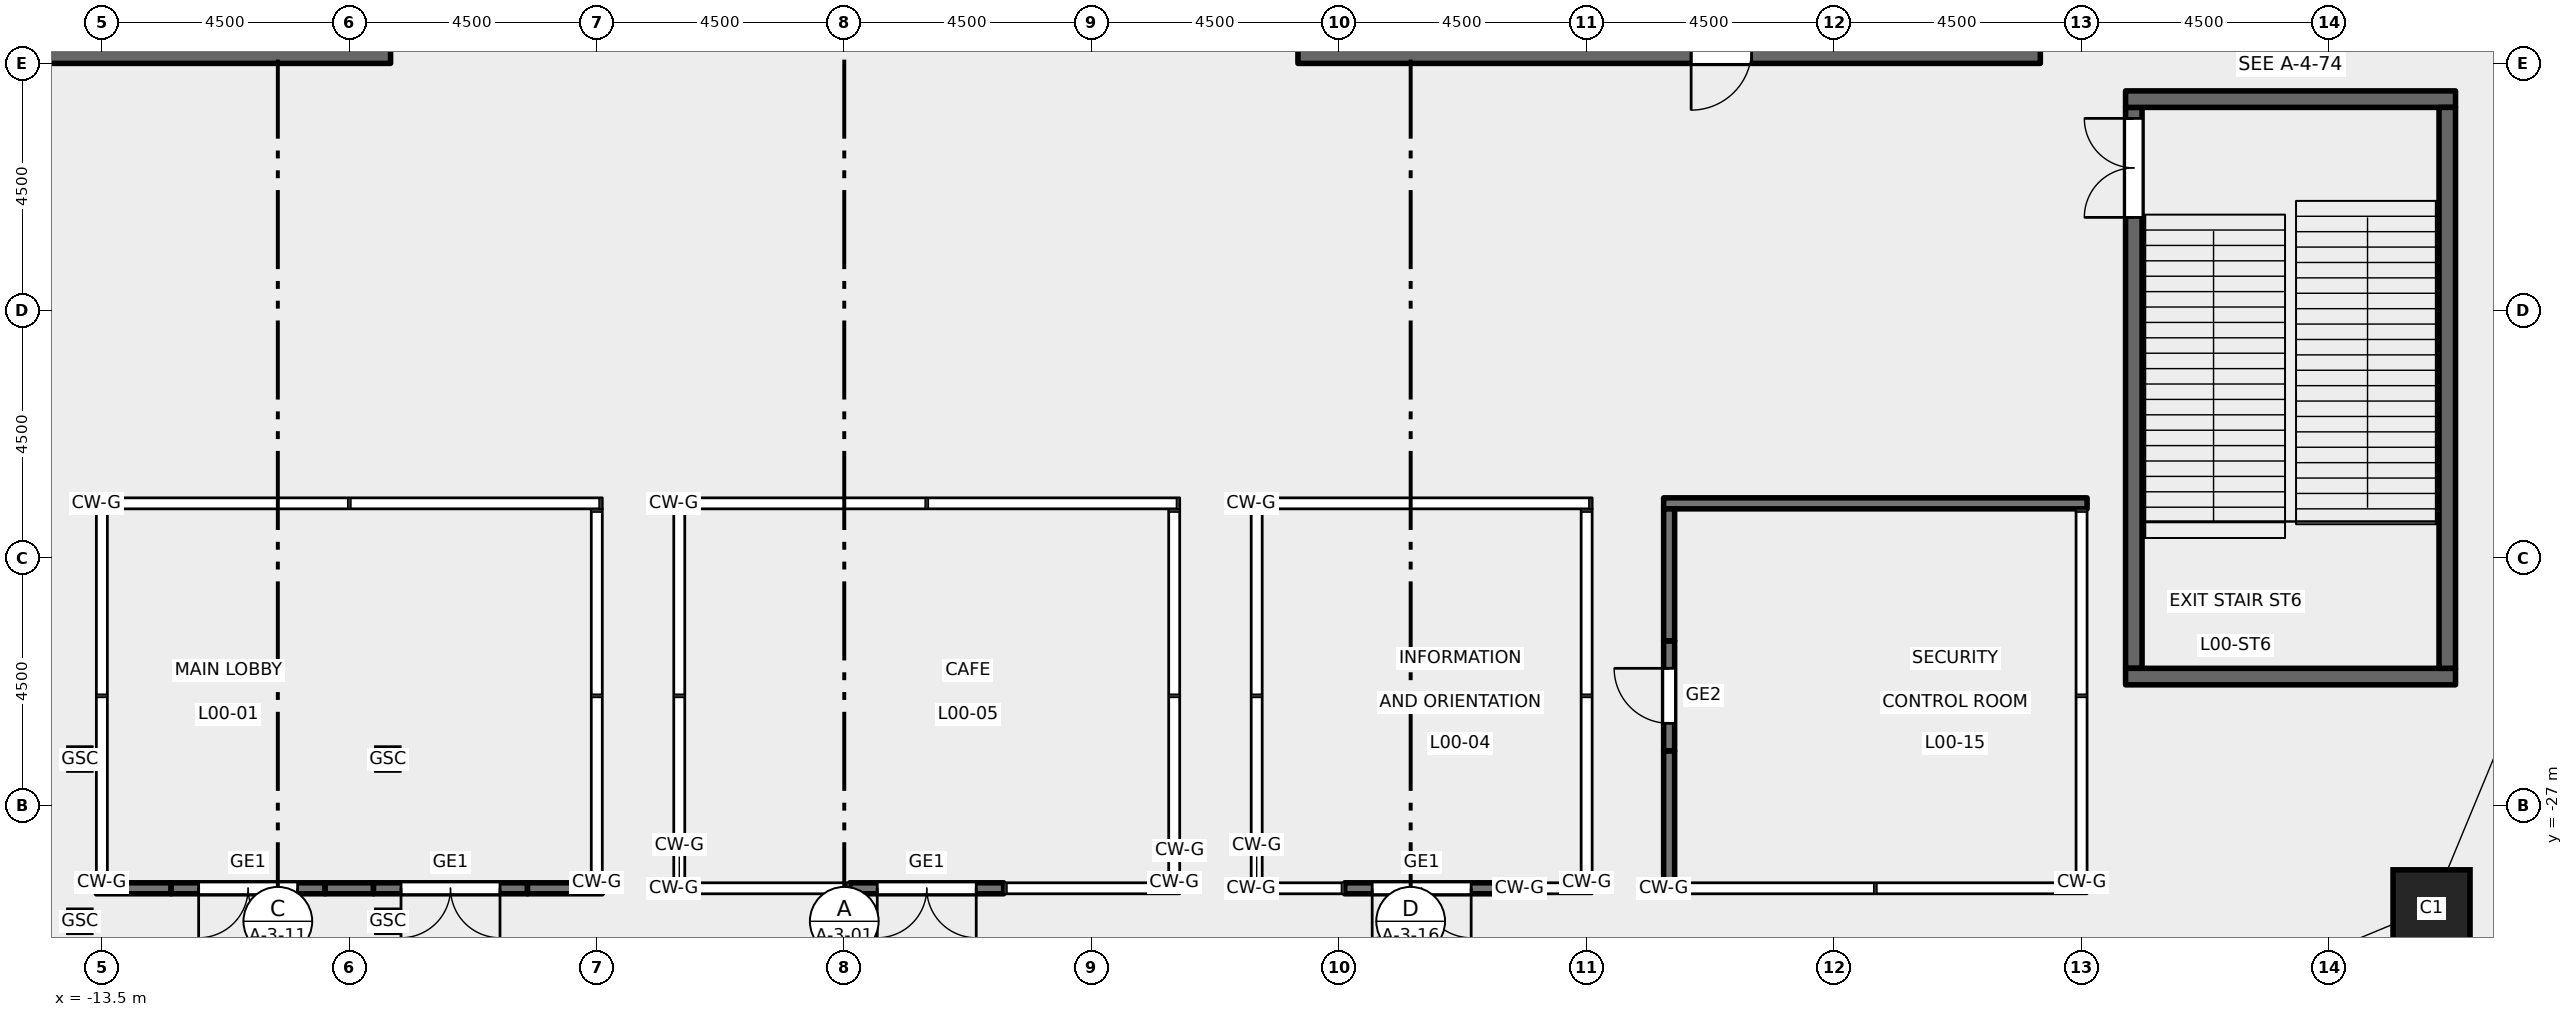
"""IFC4 building model, lengths in metres.
Left out: names, types, materials, properties, quantities, classifications, styles, units other than length and angle.
Written with IfcOpenShell. Run it as: python <this file> out.ifc"""

import sys

from ifc_helpers import new_model, si_unit, direction, frame, frame_2d, origin, origin_2d, place, context, subcontext, project, spatial, rectangle, hollow_rectangle, extrude, element, fill, save


model = new_model("IFC4")
c1 = context("Model", 3, precision=1e-05, world=origin(), true_north=direction((0.0, 1.0)))
c2 = subcontext(c1, "Body", "Model", "MODEL_VIEW")
j1 = project(units=[si_unit("LENGTHUNIT", "METRE"), si_unit("PLANEANGLEUNIT", "RADIAN")], contexts=[c1])
p1 = place(None, origin())
s1 = spatial("IfcSite", under=j1, at=p1, CompositionType="ELEMENT")
p2 = place(p1, origin())
s2 = spatial("IfcBuilding", under=s1, at=p2, CompositionType="ELEMENT")
p3 = place(p2, origin())
s3 = spatial("IfcBuildingStorey", under=s2, at=p3, CompositionType="ELEMENT", Elevation=0.0)
p4 = place(p3, frame((28.864, -28.864, 0.0), z_axis=(0.0, 0.0, 1.0), x_axis=(1.0, 0.0, 0.0)))
e1 = element("IfcColumn", 1, at=p4, inside=s3, PredefinedType="COLUMN", context=c2, shape_type="SweptSolid", body=[
    extrude(hollow_rectangle(XDim=1.4, YDim=1.4, WallThickness=0.07, at=origin_2d()), origin(), (0.0, 0.0, 1.0), 7.2),
])
p5 = place(p3, frame((-8.25, -13.25, 0.0), z_axis=(0.0, 0.0, 1.0), x_axis=(-1.0, 0.0, 0.0)))
e2 = element("IfcWall", 2, at=p5, inside=s3, PredefinedType="SHEAR", context=c2, shape_type="SweptSolid", body=[
    extrude(rectangle(XDim=13.5, YDim=0.5, at=frame_2d((6.75, 0.0))), origin(), (0.0, 0.0, 1.0), 7.0),
])
p6 = place(p5, frame((7.15, 0.0, 0.0)))
e3 = element("IfcOpeningElement", 3, at=p6, cuts=e2, PredefinedType="OPENING", context=c2, shape_type="SweptSolid", body=[
    extrude(rectangle(XDim=1.1, YDim=2.1, at=frame_2d((0.55, 1.05))), frame((0.0, 0.26, 0.0), z_axis=(0.0, -1.0, 0.0), x_axis=(1.0, 0.0, 0.0)), (0.0, 0.0, 1.0), 0.52),
])
p7 = place(p3, frame((8.25, -13.25, 0.0), z_axis=(0.0, 0.0, 1.0), x_axis=(1.0, 0.0, 0.0)))
e4 = element("IfcWall", 4, at=p7, inside=s3, PredefinedType="SHEAR", context=c2, shape_type="SweptSolid", body=[
    extrude(rectangle(XDim=13.5, YDim=0.5, at=frame_2d((6.75, 0.0))), origin(), (0.0, 0.0, 1.0), 7.0),
])
p8 = place(p7, frame((7.15, 0.0, 0.0)))
e5 = element("IfcOpeningElement", 5, at=p8, cuts=e4, PredefinedType="OPENING", context=c2, shape_type="SweptSolid", body=[
    extrude(rectangle(XDim=1.1, YDim=2.1, at=frame_2d((0.55, 1.05))), frame((0.0, 0.26, 0.0), z_axis=(0.0, -1.0, 0.0), x_axis=(1.0, 0.0, 0.0)), (0.0, 0.0, 1.0), 0.52),
])
p9 = place(p3, frame((-13.6, -28.5, 0.0), z_axis=(0.0, 0.0, 1.0), x_axis=(1.0, 0.0, 0.0)))
e6 = element("IfcWall", 6, at=p9, inside=s3, PredefinedType="SOLIDWALL", context=c2, shape_type="SweptSolid", body=[
    extrude(rectangle(XDim=1.36, YDim=0.2, at=frame_2d((0.68, 0.0))), origin(), (0.0, 0.0, 1.0), 4.3),
])
p10 = place(p3, frame((-12.24, -28.5, 0.0), z_axis=(0.0, 0.0, 1.0), x_axis=(1.0, 0.0, 0.0)))
e7 = element("IfcWall", 7, at=p10, inside=s3, PredefinedType="SOLIDWALL", context=c2, shape_type="SweptSolid", body=[
    extrude(rectangle(XDim=2.8, YDim=0.2, at=frame_2d((1.4, 0.0))), origin(), (0.0, 0.0, 1.0), 4.3),
])
p11 = place(p10, frame((0.5, 0.0, 0.0)))
e8 = element("IfcOpeningElement", 8, at=p11, cuts=e7, PredefinedType="OPENING", context=c2, shape_type="SweptSolid", body=[
    extrude(rectangle(XDim=1.8, YDim=2.4, at=frame_2d((0.9, 1.2))), frame((0.0, 0.11, 0.0), z_axis=(0.0, -1.0, 0.0), x_axis=(1.0, 0.0, 0.0)), (0.0, 0.0, 1.0), 0.22),
])
p12 = place(p3, frame((-9.44, -28.5, 0.0), z_axis=(0.0, 0.0, 1.0), x_axis=(1.0, 0.0, 0.0)))
e9 = element("IfcWall", 9, at=p12, inside=s3, PredefinedType="SOLIDWALL", context=c2, shape_type="SweptSolid", body=[
    extrude(rectangle(XDim=0.88, YDim=0.2, at=frame_2d((0.44, 0.0))), origin(), (0.0, 0.0, 1.0), 4.3),
])
p13 = place(p3, frame((-8.56, -28.5, 0.0), z_axis=(0.0, 0.0, 1.0), x_axis=(1.0, 0.0, 0.0)))
e10 = element("IfcWall", 10, at=p13, inside=s3, PredefinedType="SOLIDWALL", context=c2, shape_type="SweptSolid", body=[
    extrude(rectangle(XDim=2.8, YDim=0.2, at=frame_2d((1.4, 0.0))), origin(), (0.0, 0.0, 1.0), 4.3),
])
p14 = place(p13, frame((0.5, 0.0, 0.0)))
e11 = element("IfcOpeningElement", 11, at=p14, cuts=e10, PredefinedType="OPENING", context=c2, shape_type="SweptSolid", body=[
    extrude(rectangle(XDim=1.8, YDim=2.4, at=frame_2d((0.9, 1.2))), frame((0.0, 0.11, 0.0), z_axis=(0.0, -1.0, 0.0), x_axis=(1.0, 0.0, 0.0)), (0.0, 0.0, 1.0), 0.22),
])
p15 = place(p3, frame((-5.76, -28.5, 0.0), z_axis=(0.0, 0.0, 1.0), x_axis=(1.0, 0.0, 0.0)))
e12 = element("IfcWall", 12, at=p15, inside=s3, PredefinedType="SOLIDWALL", context=c2, shape_type="SweptSolid", body=[
    extrude(rectangle(XDim=1.36, YDim=0.2, at=frame_2d((0.68, 0.0))), origin(), (0.0, 0.0, 1.0), 4.3),
])
p16 = place(p3, frame((9.1, -28.5, 0.0), z_axis=(0.0, 0.0, 1.0), x_axis=(1.0, 0.0, 0.0)))
e13 = element("IfcWall", 13, at=p16, inside=s3, PredefinedType="SOLIDWALL", context=c2, shape_type="SweptSolid", body=[
    extrude(rectangle(XDim=2.8, YDim=0.2, at=frame_2d((1.4, 0.0))), origin(), (0.0, 0.0, 1.0), 4.3),
])
p17 = place(p16, frame((0.5, 0.0, 0.0)))
e14 = element("IfcOpeningElement", 14, at=p17, cuts=e13, PredefinedType="OPENING", context=c2, shape_type="SweptSolid", body=[
    extrude(rectangle(XDim=1.8, YDim=2.4, at=frame_2d((0.9, 1.2))), frame((0.0, 0.11, 0.0), z_axis=(0.0, -1.0, 0.0), x_axis=(1.0, 0.0, 0.0)), (0.0, 0.0, 1.0), 0.22),
])
p18 = place(p3, frame((0.1, -28.5, 0.0), z_axis=(0.0, 0.0, 1.0), x_axis=(1.0, 0.0, 0.0)))
e15 = element("IfcWall", 15, at=p18, inside=s3, PredefinedType="SOLIDWALL", context=c2, shape_type="SweptSolid", body=[
    extrude(rectangle(XDim=2.8, YDim=0.2, at=frame_2d((1.4, 0.0))), origin(), (0.0, 0.0, 1.0), 4.3),
])
p19 = place(p18, frame((0.5, 0.0, 0.0)))
e16 = element("IfcOpeningElement", 16, at=p19, cuts=e15, PredefinedType="OPENING", context=c2, shape_type="SweptSolid", body=[
    extrude(rectangle(XDim=1.8, YDim=2.4, at=frame_2d((0.9, 1.2))), frame((0.0, 0.11, 0.0), z_axis=(0.0, -1.0, 0.0), x_axis=(1.0, 0.0, 0.0)), (0.0, 0.0, 1.0), 0.22),
])
p20 = place(p3, frame((14.9, -21.5, 0.0), z_axis=(0.0, 0.0, 1.0), x_axis=(1.0, 0.0, 0.0)))
e17 = element("IfcWall", 17, at=p20, inside=s3, PredefinedType="SOLIDWALL", context=c2, shape_type="SweptSolid", body=[
    extrude(rectangle(XDim=7.7, YDim=0.2, at=frame_2d((3.85, 0.0))), origin(), (0.0, 0.0, 1.0), 4.3),
])
p21 = place(p3, frame((15.0, -28.4, 0.0), z_axis=(0.0, 0.0, 1.0), x_axis=(0.0, 1.0, 0.0)))
e18 = element("IfcWall", 18, at=p21, inside=s3, PredefinedType="SOLIDWALL", context=c2, shape_type="SweptSolid", body=[
    extrude(rectangle(XDim=2.4, YDim=0.2, at=frame_2d((1.2, 0.0))), origin(), (0.0, 0.0, 1.0), 4.3),
])
p22 = place(p3, frame((15.0, -26.0, 0.0), z_axis=(0.0, 0.0, 1.0), x_axis=(0.0, 1.0, 0.0)))
e19 = element("IfcWall", 19, at=p22, inside=s3, PredefinedType="SOLIDWALL", context=c2, shape_type="SweptSolid", body=[
    extrude(rectangle(XDim=2.0, YDim=0.2, at=frame_2d((1.0, 0.0))), origin(), (0.0, 0.0, 1.0), 4.3),
])
p23 = place(p22, frame((0.5, 0.0, 0.0)))
e20 = element("IfcOpeningElement", 20, at=p23, cuts=e19, PredefinedType="OPENING", context=c2, shape_type="SweptSolid", body=[
    extrude(rectangle(XDim=1.0, YDim=2.1, at=frame_2d((0.5, 1.05))), frame((0.0, 0.11, 0.0), z_axis=(0.0, -1.0, 0.0), x_axis=(1.0, 0.0, 0.0)), (0.0, 0.0, 1.0), 0.22),
])
p24 = place(p3, frame((15.0, -24.0, 0.0), z_axis=(0.0, 0.0, 1.0), x_axis=(0.0, 1.0, 0.0)))
e21 = element("IfcWall", 21, at=p24, inside=s3, PredefinedType="SOLIDWALL", context=c2, shape_type="SweptSolid", body=[
    extrude(rectangle(XDim=2.4, YDim=0.2, at=frame_2d((1.2, 0.0))), origin(), (0.0, 0.0, 1.0), 4.3),
])
for number, where, z_axis, x_axis in (
    (22, (-13.9, -29.1, 0.0), (0.0, 0.0, 1.0), (1.0, 0.0, 0.0)),
    (23, (-13.9, -26.15, 0.0), (0.0, 0.0, 1.0), (1.0, 0.0, 0.0)),
    (24, (-8.3, -29.1, 0.0), (0.0, 0.0, 1.0), (1.0, 0.0, 0.0)),
    (25, (-8.3, -26.15, 0.0), (0.0, 0.0, 1.0), (1.0, 0.0, 0.0)),
):
    element("IfcColumn", number, at=place(p3, frame(where, z_axis=z_axis, x_axis=x_axis)), inside=s3, PredefinedType="COLUMN", context=c2, shape_type="SweptSolid", body=[
        extrude(rectangle(XDim=0.4, YDim=0.4, at=origin_2d()), origin(), (0.0, 0.0, 1.0), 7.2),
    ])
p25 = place(p3, frame((23.45, -14.3, 0.0), z_axis=(0.0, 0.0, 1.0), x_axis=(0.0, -1.0, 0.0)))
e26 = element("IfcWall", 26, at=p25, inside=s3, PredefinedType="SHEAR", context=c2, shape_type="SweptSolid", body=[
    extrude(rectangle(XDim=10.2, YDim=0.3, at=frame_2d((5.1, 0.0))), origin(), (0.0, 0.0, 1.0), 7.0),
])
p26 = place(p25, frame((0.2, 0.0, 0.0)))
e27 = element("IfcOpeningElement", 27, at=p26, cuts=e26, PredefinedType="OPENING", context=c2, shape_type="SweptSolid", body=[
    extrude(rectangle(XDim=1.8, YDim=2.1, at=frame_2d((0.9, 1.05))), frame((0.0, 0.16, 0.0), z_axis=(0.0, -1.0, 0.0), x_axis=(1.0, 0.0, 0.0)), (0.0, 0.0, 1.0), 0.32),
])
for number, where, z_axis, x_axis in (
    (28, (29.3, -24.65, 0.0), (0.0, 0.0, 1.0), (-1.0, 0.0, 0.0)),
    (29, (29.3, -14.15, 0.0), (0.0, 0.0, 1.0), (-1.0, 0.0, 0.0)),
):
    element("IfcWall", number, at=place(p3, frame(where, z_axis=z_axis, x_axis=x_axis)), inside=s3, PredefinedType="SHEAR", context=c2, shape_type="SweptSolid", body=[
        extrude(rectangle(XDim=6.0, YDim=0.3, at=frame_2d((3.0, 0.0))), origin(), (0.0, 0.0, 1.0), 7.0),
    ])
p27 = place(p3, frame((29.15, -14.3, 0.0), z_axis=(0.0, 0.0, 1.0), x_axis=(0.0, -1.0, 0.0)))
e30 = element("IfcWall", 30, at=p27, inside=s3, PredefinedType="SHEAR", context=c2, shape_type="SweptSolid", body=[
    extrude(rectangle(XDim=10.2, YDim=0.3, at=frame_2d((5.1, 0.0))), origin(), (0.0, 0.0, 1.0), 7.0),
])
p28 = place(p11, frame((1.8, 0.0, 0.0), z_axis=(0.0, 0.0, 1.0), x_axis=(-1.0, 0.0, 0.0)))
e31 = element("IfcDoor", 31, at=p28, inside=s3, OperationType="DOUBLE_DOOR_SINGLE_SWING", PredefinedType="DOOR", context=c2, shape_type="SweptSolid", body=[
    extrude(rectangle(XDim=1.8, YDim=2.4, at=frame_2d((0.9, 1.2))), frame((0.0, 0.025, 0.0), z_axis=(0.0, -1.0, 0.0), x_axis=(1.0, 0.0, 0.0)), (0.0, 0.0, 1.0), 0.05),
])
fill(e8, e31)
p29 = place(p14, frame((1.8, 0.0, 0.0), z_axis=(0.0, 0.0, 1.0), x_axis=(-1.0, 0.0, 0.0)))
e32 = element("IfcDoor", 32, at=p29, inside=s3, OperationType="DOUBLE_DOOR_SINGLE_SWING", PredefinedType="DOOR", context=c2, shape_type="SweptSolid", body=[
    extrude(rectangle(XDim=1.8, YDim=2.4, at=frame_2d((0.9, 1.2))), frame((0.0, 0.025, 0.0), z_axis=(0.0, -1.0, 0.0), x_axis=(1.0, 0.0, 0.0)), (0.0, 0.0, 1.0), 0.05),
])
fill(e11, e32)
p30 = place(p17, frame((1.8, 0.0, 0.0), z_axis=(0.0, 0.0, 1.0), x_axis=(-1.0, 0.0, 0.0)))
e33 = element("IfcDoor", 33, at=p30, inside=s3, OperationType="DOUBLE_DOOR_SINGLE_SWING", PredefinedType="DOOR", context=c2, shape_type="SweptSolid", body=[
    extrude(rectangle(XDim=1.8, YDim=2.4, at=frame_2d((0.9, 1.2))), frame((0.0, 0.025, 0.0), z_axis=(0.0, -1.0, 0.0), x_axis=(1.0, 0.0, 0.0)), (0.0, 0.0, 1.0), 0.05),
])
fill(e14, e33)
p31 = place(p19, frame((1.8, 0.0, 0.0), z_axis=(0.0, 0.0, 1.0), x_axis=(-1.0, 0.0, 0.0)))
e34 = element("IfcDoor", 34, at=p31, inside=s3, OperationType="DOUBLE_DOOR_SINGLE_SWING", PredefinedType="DOOR", context=c2, shape_type="SweptSolid", body=[
    extrude(rectangle(XDim=1.8, YDim=2.4, at=frame_2d((0.9, 1.2))), frame((0.0, 0.025, 0.0), z_axis=(0.0, -1.0, 0.0), x_axis=(1.0, 0.0, 0.0)), (0.0, 0.0, 1.0), 0.05),
])
fill(e16, e34)
p32 = place(p23, origin())
e35 = element("IfcDoor", 35, at=p32, inside=s3, OperationType="SINGLE_SWING_RIGHT", PredefinedType="DOOR", context=c2, shape_type="SweptSolid", body=[
    extrude(rectangle(XDim=1.0, YDim=2.1, at=frame_2d((0.5, 1.05))), frame((0.0, 0.025, 0.0), z_axis=(0.0, -1.0, 0.0), x_axis=(1.0, 0.0, 0.0)), (0.0, 0.0, 1.0), 0.05),
])
fill(e20, e35)
p33 = place(p26, frame((1.8, 0.0, 0.0), z_axis=(0.0, 0.0, 1.0), x_axis=(-1.0, 0.0, 0.0)))
e36 = element("IfcDoor", 36, at=p33, inside=s3, OperationType="DOUBLE_DOOR_SINGLE_SWING", PredefinedType="DOOR", context=c2, shape_type="SweptSolid", body=[
    extrude(rectangle(XDim=1.8, YDim=2.1, at=frame_2d((0.9, 1.05))), frame((0.0, 0.025, 0.0), z_axis=(0.0, -1.0, 0.0), x_axis=(1.0, 0.0, 0.0)), (0.0, 0.0, 1.0), 0.05),
])
fill(e27, e36)
save(model, sys.argv[1])
